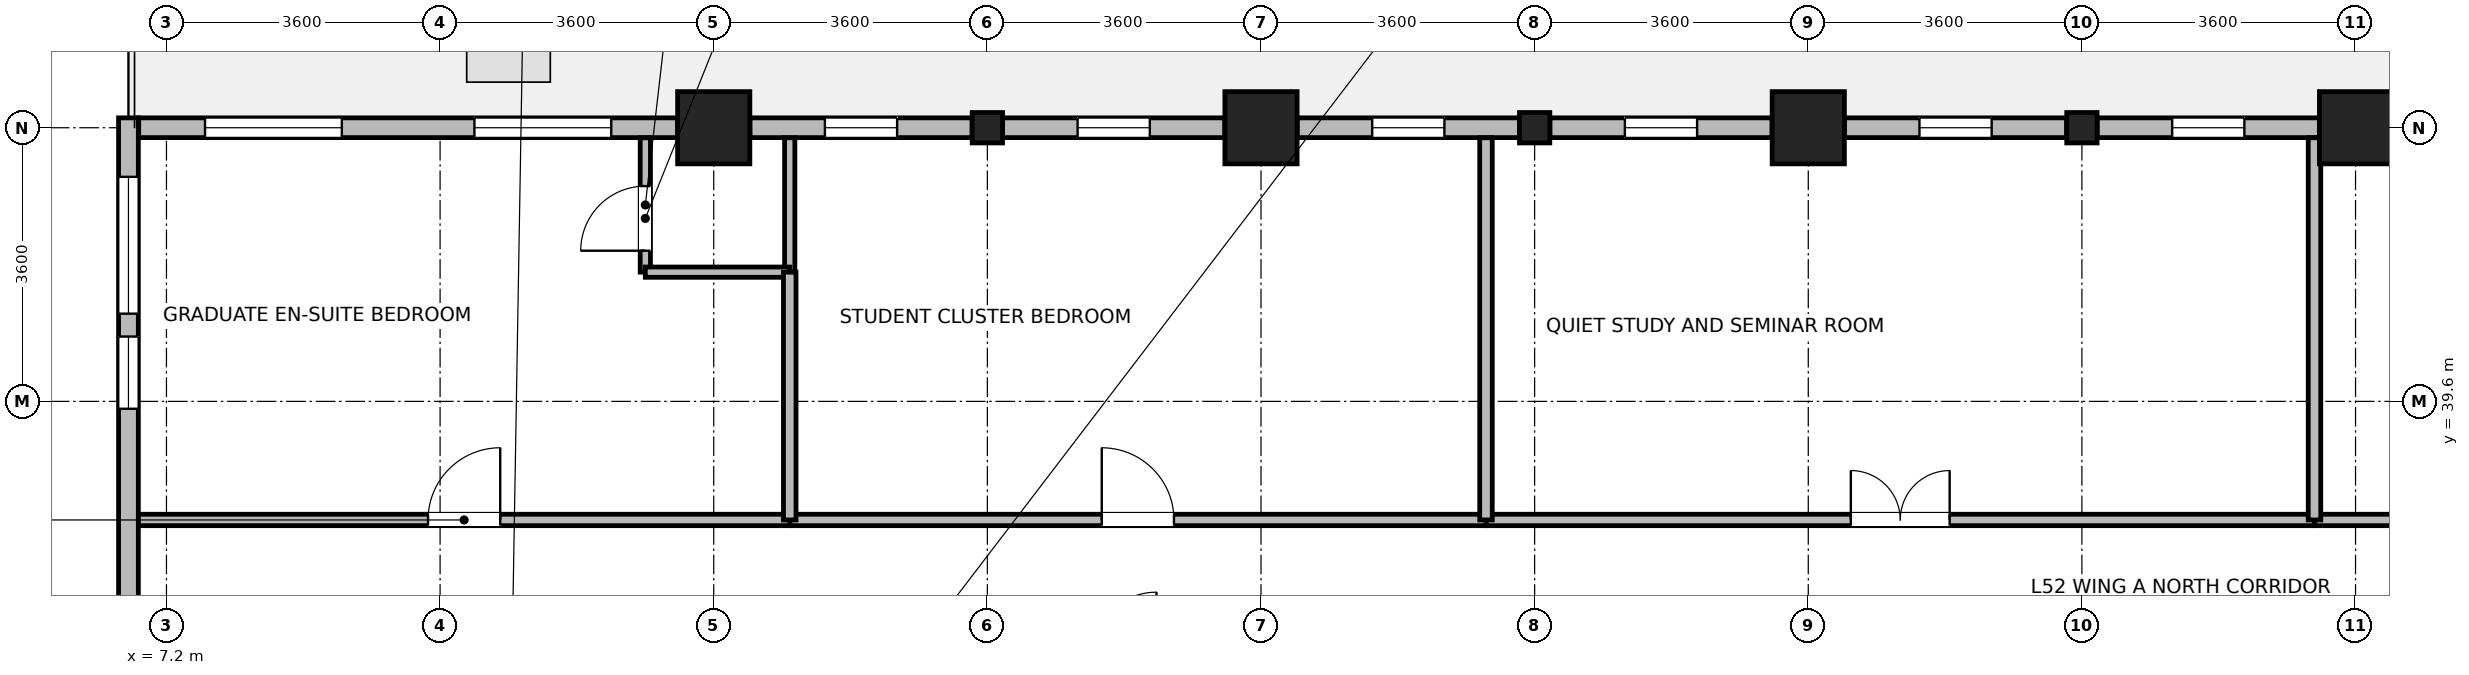
"""IFC4 building model, lengths in metres.
Left out: names, types, materials, properties, quantities, classifications, styles, units other than length and angle.
Written with IfcOpenShell. Run it as: python <this file> out.ifc"""

import sys

from ifc_helpers import new_model, si_unit, direction, frame, frame_2d, origin, origin_2d, place, context, subcontext, project, spatial, rectangle, i_section, extrude, source, transform, mapped, element, fill, save


model = new_model("IFC4")
c1 = context("Model", 3, precision=1e-05, world=origin(), true_north=direction((0.0, 1.0)))
c2 = subcontext(c1, "Body", "Model", "MODEL_VIEW")
j1 = project(units=[si_unit("LENGTHUNIT", "METRE"), si_unit("PLANEANGLEUNIT", "RADIAN")], contexts=[c1])
p1 = place(None, origin())
s1 = spatial("IfcSite", under=j1, at=p1, CompositionType="ELEMENT")
p2 = place(p1, origin())
s2 = spatial("IfcBuilding", under=s1, at=p2, CompositionType="ELEMENT")
p3 = place(p2, frame((0.0, 0.0, 205.5)))
s3 = spatial("IfcBuildingStorey", under=s2, at=p3, CompositionType="ELEMENT", Elevation=205.5)
m1 = source(origin(), c2, "Body", "SweptSolid", [
    extrude(rectangle(XDim=0.95, YDim=0.95, at=origin_2d()), origin(), (0.0, 0.0, 1.0), 3.7),
])
for number, where, z_axis, x_axis in (
    (1, (14.4, 43.2, 0.0), (0.0, 0.0, 1.0), (1.0, 0.0, 0.0)),
    (2, (21.6, 43.2, 0.0), (0.0, 0.0, 1.0), (1.0, 0.0, 0.0)),
    (3, (28.8, 43.2, 0.0), (0.0, 0.0, 1.0), (1.0, 0.0, 0.0)),
    (4, (36.0, 43.2, 0.0), (0.0, 0.0, 1.0), (1.0, 0.0, 0.0)),
):
    element("IfcColumn", number, at=place(p3, frame(where, z_axis=z_axis, x_axis=x_axis)), inside=s3, PredefinedType="COLUMN", context=c2, shape_type="MappedRepresentation", body=[
        mapped(m1, transform((0.0, 0.0, 0.0), x_axis=(1.0, 0.0, 0.0), y_axis=(0.0, 1.0, 0.0), z_axis=(0.0, 0.0, 1.0), scale=1.0)),
    ])
m2 = source(origin(), c2, "Body", "SweptSolid", [
    extrude(i_section(OverallWidth=0.399, OverallDepth=0.4, WebThickness=0.017, FlangeThickness=0.023, FilletRadius=0.015, at=origin_2d()), origin(), (0.0, 0.0, 1.0), 3.7),
])
for number, where, z_axis, x_axis in (
    (5, (18.0, 43.2, 0.0), (0.0, 0.0, 1.0), (1.0, 0.0, 0.0)),
    (6, (25.2, 43.2, 0.0), (0.0, 0.0, 1.0), (1.0, 0.0, 0.0)),
    (7, (32.4, 43.2, 0.0), (0.0, 0.0, 1.0), (1.0, 0.0, 0.0)),
):
    element("IfcColumn", number, at=place(p3, frame(where, z_axis=z_axis, x_axis=x_axis)), inside=s3, PredefinedType="COLUMN", context=c2, shape_type="MappedRepresentation", body=[
        mapped(m2, transform((0.0, 0.0, 0.0), x_axis=(1.0, 0.0, 0.0), y_axis=(0.0, 1.0, 0.0), z_axis=(0.0, 0.0, 1.0), scale=1.0)),
    ])
p4 = place(p3, frame((32.601, 43.2, 0.0), z_axis=(0.0, 0.0, 1.0), x_axis=(1.0, 0.0, 0.0)))
e8 = element("IfcWall", 8, at=p4, inside=s3, PredefinedType="STANDARD", context=c2, shape_type="SweptSolid", body=[
    extrude(rectangle(XDim=2.923, YDim=0.26, at=frame_2d((1.462, 0.0))), origin(), (0.0, 0.0, 1.0), 3.0),
])
p5 = place(p4, frame((0.987, 0.0, 0.85)))
e9 = element("IfcOpeningElement", 9, at=p5, cuts=e8, PredefinedType="OPENING", context=c2, shape_type="SweptSolid", body=[
    extrude(rectangle(XDim=0.95, YDim=1.75, at=frame_2d((0.475, 0.875))), frame((0.0, 0.14, 0.0), z_axis=(0.0, -1.0, 0.0), x_axis=(1.0, 0.0, 0.0)), (0.0, 0.0, 1.0), 0.28),
])
p6 = place(p3, frame((29.276, 43.2, 0.0), z_axis=(0.0, 0.0, 1.0), x_axis=(1.0, 0.0, 0.0)))
e10 = element("IfcWall", 10, at=p6, inside=s3, PredefinedType="STANDARD", context=c2, shape_type="SweptSolid", body=[
    extrude(rectangle(XDim=2.924, YDim=0.26, at=frame_2d((1.462, 0.0))), origin(), (0.0, 0.0, 1.0), 3.0),
])
p7 = place(p6, frame((0.987, 0.0, 0.85)))
e11 = element("IfcOpeningElement", 11, at=p7, cuts=e10, PredefinedType="OPENING", context=c2, shape_type="SweptSolid", body=[
    extrude(rectangle(XDim=0.95, YDim=1.75, at=frame_2d((0.475, 0.875))), frame((0.0, 0.14, 0.0), z_axis=(0.0, -1.0, 0.0), x_axis=(1.0, 0.0, 0.0)), (0.0, 0.0, 1.0), 0.28),
])
p8 = place(p3, frame((25.4, 43.2, 0.0), z_axis=(0.0, 0.0, 1.0), x_axis=(1.0, 0.0, 0.0)))
e12 = element("IfcWall", 12, at=p8, inside=s3, PredefinedType="STANDARD", context=c2, shape_type="SweptSolid", body=[
    extrude(rectangle(XDim=2.924, YDim=0.26, at=frame_2d((1.462, 0.0))), origin(), (0.0, 0.0, 1.0), 3.0),
])
p9 = place(p8, frame((0.987, 0.0, 0.85)))
e13 = element("IfcOpeningElement", 13, at=p9, cuts=e12, PredefinedType="OPENING", context=c2, shape_type="SweptSolid", body=[
    extrude(rectangle(XDim=0.95, YDim=1.75, at=frame_2d((0.475, 0.875))), frame((0.0, 0.14, 0.0), z_axis=(0.0, -1.0, 0.0), x_axis=(1.0, 0.0, 0.0)), (0.0, 0.0, 1.0), 0.28),
])
p10 = place(p3, frame((22.076, 43.2, 0.0), z_axis=(0.0, 0.0, 1.0), x_axis=(1.0, 0.0, 0.0)))
e14 = element("IfcWall", 14, at=p10, inside=s3, PredefinedType="STANDARD", context=c2, shape_type="SweptSolid", body=[
    extrude(rectangle(XDim=2.924, YDim=0.26, at=frame_2d((1.462, 0.0))), origin(), (0.0, 0.0, 1.0), 3.0),
])
p11 = place(p10, frame((0.987, 0.0, 0.85)))
e15 = element("IfcOpeningElement", 15, at=p11, cuts=e14, PredefinedType="OPENING", context=c2, shape_type="SweptSolid", body=[
    extrude(rectangle(XDim=0.95, YDim=1.75, at=frame_2d((0.475, 0.875))), frame((0.0, 0.14, 0.0), z_axis=(0.0, -1.0, 0.0), x_axis=(1.0, 0.0, 0.0)), (0.0, 0.0, 1.0), 0.28),
])
p12 = place(p3, frame((18.2, 43.2, 0.0), z_axis=(0.0, 0.0, 1.0), x_axis=(1.0, 0.0, 0.0)))
e16 = element("IfcWall", 16, at=p12, inside=s3, PredefinedType="STANDARD", context=c2, shape_type="SweptSolid", body=[
    extrude(rectangle(XDim=2.924, YDim=0.26, at=frame_2d((1.462, 0.0))), origin(), (0.0, 0.0, 1.0), 3.0),
])
p13 = place(p12, frame((0.987, 0.0, 0.85)))
e17 = element("IfcOpeningElement", 17, at=p13, cuts=e16, PredefinedType="OPENING", context=c2, shape_type="SweptSolid", body=[
    extrude(rectangle(XDim=0.95, YDim=1.75, at=frame_2d((0.475, 0.875))), frame((0.0, 0.14, 0.0), z_axis=(0.0, -1.0, 0.0), x_axis=(1.0, 0.0, 0.0)), (0.0, 0.0, 1.0), 0.28),
])
p14 = place(p3, frame((14.876, 43.2, 0.0), z_axis=(0.0, 0.0, 1.0), x_axis=(1.0, 0.0, 0.0)))
e18 = element("IfcWall", 18, at=p14, inside=s3, PredefinedType="STANDARD", context=c2, shape_type="SweptSolid", body=[
    extrude(rectangle(XDim=2.924, YDim=0.26, at=frame_2d((1.462, 0.0))), origin(), (0.0, 0.0, 1.0), 3.0),
])
p15 = place(p14, frame((0.987, 0.0, 0.85)))
e19 = element("IfcOpeningElement", 19, at=p15, cuts=e18, PredefinedType="OPENING", context=c2, shape_type="SweptSolid", body=[
    extrude(rectangle(XDim=0.95, YDim=1.75, at=frame_2d((0.475, 0.875))), frame((0.0, 0.14, 0.0), z_axis=(0.0, -1.0, 0.0), x_axis=(1.0, 0.0, 0.0)), (0.0, 0.0, 1.0), 0.28),
])
p16 = place(p3, frame((6.835, 43.2, 0.0), z_axis=(0.0, 0.0, 1.0), x_axis=(1.0, 0.0, 0.0)))
e20 = element("IfcWall", 20, at=p16, inside=s3, PredefinedType="STANDARD", context=c2, shape_type="SweptSolid", body=[
    extrude(rectangle(XDim=7.089, YDim=0.26, at=frame_2d((3.544, 0.0))), origin(), (0.0, 0.0, 1.0), 3.45),
])
p17 = place(p16, frame((0.872, 0.0, 0.85)))
e21 = element("IfcOpeningElement", 21, at=p17, cuts=e20, PredefinedType="OPENING", context=c2, shape_type="SweptSolid", body=[
    extrude(rectangle(XDim=1.8, YDim=1.85, at=frame_2d((0.9, 0.925))), frame((0.0, 0.14, 0.0), z_axis=(0.0, -1.0, 0.0), x_axis=(1.0, 0.0, 0.0)), (0.0, 0.0, 1.0), 0.28),
])
p18 = place(p16, frame((4.417, 0.0, 0.85)))
e22 = element("IfcOpeningElement", 22, at=p18, cuts=e20, PredefinedType="OPENING", context=c2, shape_type="SweptSolid", body=[
    extrude(rectangle(XDim=1.8, YDim=1.85, at=frame_2d((0.9, 0.925))), frame((0.0, 0.14, 0.0), z_axis=(0.0, -1.0, 0.0), x_axis=(1.0, 0.0, 0.0)), (0.0, 0.0, 1.0), 0.28),
])
p19 = place(p3, frame((6.7, 36.626, 0.0), z_axis=(0.0, 0.0, 1.0), x_axis=(0.0, 1.0, 0.0)))
e23 = element("IfcWall", 23, at=p19, inside=s3, PredefinedType="STANDARD", context=c2, shape_type="SweptSolid", body=[
    extrude(rectangle(XDim=6.704, YDim=0.26, at=frame_2d((3.352, 0.0))), origin(), (0.0, 0.0, 1.0), 3.45),
])
p20 = place(p19, frame((4.128, 0.0, 0.85)))
e24 = element("IfcOpeningElement", 24, at=p20, cuts=e23, PredefinedType="OPENING", context=c2, shape_type="SweptSolid", body=[
    extrude(rectangle(XDim=1.8, YDim=1.85, at=frame_2d((0.9, 0.925))), frame((0.0, 0.14, 0.0), z_axis=(0.0, -1.0, 0.0), x_axis=(1.0, 0.0, 0.0)), (0.0, 0.0, 1.0), 0.28),
])
p21 = place(p19, frame((2.877, 0.0, 0.85)))
e25 = element("IfcOpeningElement", 25, at=p21, cuts=e23, PredefinedType="OPENING", context=c2, shape_type="SweptSolid", body=[
    extrude(rectangle(XDim=0.95, YDim=1.75, at=frame_2d((0.475, 0.875))), frame((0.0, 0.14, 0.0), z_axis=(0.0, -1.0, 0.0), x_axis=(1.0, 0.0, 0.0)), (0.0, 0.0, 1.0), 0.28),
])
p22 = place(p3, frame((13.5, 41.3, 0.0), z_axis=(0.0, 0.0, 1.0), x_axis=(0.0, 1.0, 0.0)))
e26 = element("IfcWall", 26, at=p22, inside=s3, PredefinedType="PARTITIONING", context=c2, shape_type="SweptSolid", body=[
    extrude(rectangle(XDim=1.768, YDim=0.135, at=frame_2d((0.884, 0.0))), origin(), (0.0, 0.0, 1.0), 3.45),
])
p23 = place(p22, frame((0.282, 0.0, 0.0)))
e27 = element("IfcOpeningElement", 27, at=p23, cuts=e26, PredefinedType="OPENING", context=c2, shape_type="SweptSolid", body=[
    extrude(rectangle(XDim=0.85, YDim=2.04, at=frame_2d((0.425, 1.02))), frame((0.0, 0.078, 0.0), z_axis=(0.0, -1.0, 0.0), x_axis=(1.0, 0.0, 0.0)), (0.0, 0.0, 1.0), 0.155),
])
p24 = place(p3, frame((15.4, 41.3, 0.0), z_axis=(0.0, 0.0, 1.0), x_axis=(0.0, 1.0, 0.0)))
e28 = element("IfcWall", 28, at=p24, inside=s3, PredefinedType="PARTITIONING", context=c2, shape_type="SweptSolid", body=[
    extrude(rectangle(XDim=1.768, YDim=0.135, at=frame_2d((0.884, 0.0))), origin(), (0.0, 0.0, 1.0), 3.45),
])
p25 = place(p3, frame((13.5, 41.3, 0.0), z_axis=(0.0, 0.0, 1.0), x_axis=(1.0, 0.0, 0.0)))
e29 = element("IfcWall", 29, at=p25, inside=s3, PredefinedType="PARTITIONING", context=c2, shape_type="SweptSolid", body=[
    extrude(rectangle(XDim=1.9, YDim=0.135, at=frame_2d((0.95, 0.0))), origin(), (0.0, 0.0, 1.0), 3.45),
])
p26 = place(p3, frame((35.46, 38.04, 0.0), z_axis=(0.0, 0.0, 1.0), x_axis=(1.0, 0.0, 0.0)))
e30 = element("IfcWall", 30, at=p26, inside=s3, PredefinedType="PARTITIONING", context=c2, shape_type="SweptSolid", body=[
    extrude(rectangle(XDim=14.08, YDim=0.15, at=frame_2d((7.04, 0.0))), origin(), (0.0, 0.0, 1.0), 3.45),
])
p27 = place(p26, frame((6.59, 0.0, 0.0)))
e31 = element("IfcOpeningElement", 31, at=p27, cuts=e30, PredefinedType="OPENING", context=c2, shape_type="SweptSolid", body=[
    extrude(rectangle(XDim=0.9, YDim=2.08, at=frame_2d((0.45, 1.04))), frame((0.0, 0.085, 0.0), z_axis=(0.0, -1.0, 0.0), x_axis=(1.0, 0.0, 0.0)), (0.0, 0.0, 1.0), 0.17),
])
p28 = place(p3, frame((24.56, 38.04, 0.0), z_axis=(0.0, 0.0, 1.0), x_axis=(1.0, 0.0, 0.0)))
e32 = element("IfcWall", 32, at=p28, inside=s3, PredefinedType="PARTITIONING", context=c2, shape_type="SweptSolid", body=[
    extrude(rectangle(XDim=10.9, YDim=0.15, at=frame_2d((5.45, 0.0))), origin(), (0.0, 0.0, 1.0), 3.45),
])
p29 = place(p28, frame((4.8, 0.0, 0.0)))
e33 = element("IfcOpeningElement", 33, at=p29, cuts=e32, PredefinedType="OPENING", context=c2, shape_type="SweptSolid", body=[
    extrude(rectangle(XDim=1.3, YDim=2.12, at=frame_2d((0.65, 1.06))), frame((0.0, 0.085, 0.0), z_axis=(0.0, -1.0, 0.0), x_axis=(1.0, 0.0, 0.0)), (0.0, 0.0, 1.0), 0.17),
])
p30 = place(p3, frame((15.4, 38.04, 0.0), z_axis=(0.0, 0.0, 1.0), x_axis=(1.0, 0.0, 0.0)))
e34 = element("IfcWall", 34, at=p30, inside=s3, PredefinedType="PARTITIONING", context=c2, shape_type="SweptSolid", body=[
    extrude(rectangle(XDim=9.16, YDim=0.15, at=frame_2d((4.58, 0.0))), origin(), (0.0, 0.0, 1.0), 3.45),
])
p31 = place(p30, frame((4.105, 0.0, 0.0)))
e35 = element("IfcOpeningElement", 35, at=p31, cuts=e34, PredefinedType="OPENING", context=c2, shape_type="SweptSolid", body=[
    extrude(rectangle(XDim=0.95, YDim=2.1, at=frame_2d((0.475, 1.05))), frame((0.0, 0.085, 0.0), z_axis=(0.0, -1.0, 0.0), x_axis=(1.0, 0.0, 0.0)), (0.0, 0.0, 1.0), 0.17),
])
p32 = place(p3, frame((6.832, 38.04, 0.0), z_axis=(0.0, 0.0, 1.0), x_axis=(1.0, 0.0, 0.0)))
e36 = element("IfcWall", 36, at=p32, inside=s3, PredefinedType="PARTITIONING", context=c2, shape_type="SweptSolid", body=[
    extrude(rectangle(XDim=8.568, YDim=0.15, at=frame_2d((4.284, 0.0))), origin(), (0.0, 0.0, 1.0), 3.45),
])
p33 = place(p32, frame((3.809, 0.0, 0.0)))
e37 = element("IfcOpeningElement", 37, at=p33, cuts=e36, PredefinedType="OPENING", context=c2, shape_type="SweptSolid", body=[
    extrude(rectangle(XDim=0.95, YDim=2.1, at=frame_2d((0.475, 1.05))), frame((0.0, 0.085, 0.0), z_axis=(0.0, -1.0, 0.0), x_axis=(1.0, 0.0, 0.0)), (0.0, 0.0, 1.0), 0.17),
])
for number, where, z_axis, x_axis in (
    (38, (24.56, 38.04, 0.0), (0.0, 0.0, 1.0), (0.0, 1.0, 0.0)),
    (39, (35.46, 38.04, 0.0), (0.0, 0.0, 1.0), (0.0, 1.0, 0.0)),
):
    element("IfcWall", number, at=place(p3, frame(where, z_axis=z_axis, x_axis=x_axis)), inside=s3, PredefinedType="PARTITIONING", context=c2, shape_type="SweptSolid", body=[
        extrude(rectangle(XDim=5.028, YDim=0.165, at=frame_2d((2.514, 0.0))), origin(), (0.0, 0.0, 1.0), 3.45),
    ])
p34 = place(p3, frame((15.4, 38.04, 0.0), z_axis=(0.0, 0.0, 1.0), x_axis=(0.0, 1.0, 0.0)))
e40 = element("IfcWall", 40, at=p34, inside=s3, PredefinedType="PARTITIONING", context=c2, shape_type="SweptSolid", body=[
    extrude(rectangle(XDim=3.26, YDim=0.165, at=frame_2d((1.63, 0.0))), origin(), (0.0, 0.0, 1.0), 3.45),
])
p35 = place(p5, origin())
e41 = element("IfcWindow", 41, at=p35, inside=s3, PartitioningType="SINGLE_PANEL", PredefinedType="WINDOW", context=c2, shape_type="SweptSolid", body=[
    extrude(rectangle(XDim=0.95, YDim=1.75, at=frame_2d((0.475, 0.875))), frame((0.0, 0.03, 0.0), z_axis=(0.0, -1.0, 0.0), x_axis=(1.0, 0.0, 0.0)), (0.0, 0.0, 1.0), 0.06),
])
fill(e9, e41)
p36 = place(p7, origin())
e42 = element("IfcWindow", 42, at=p36, inside=s3, PartitioningType="SINGLE_PANEL", PredefinedType="WINDOW", context=c2, shape_type="SweptSolid", body=[
    extrude(rectangle(XDim=0.95, YDim=1.75, at=frame_2d((0.475, 0.875))), frame((0.0, 0.03, 0.0), z_axis=(0.0, -1.0, 0.0), x_axis=(1.0, 0.0, 0.0)), (0.0, 0.0, 1.0), 0.06),
])
fill(e11, e42)
p37 = place(p9, origin())
e43 = element("IfcWindow", 43, at=p37, inside=s3, PartitioningType="SINGLE_PANEL", PredefinedType="WINDOW", context=c2, shape_type="SweptSolid", body=[
    extrude(rectangle(XDim=0.95, YDim=1.75, at=frame_2d((0.475, 0.875))), frame((0.0, 0.03, 0.0), z_axis=(0.0, -1.0, 0.0), x_axis=(1.0, 0.0, 0.0)), (0.0, 0.0, 1.0), 0.06),
])
fill(e13, e43)
p38 = place(p11, origin())
e44 = element("IfcWindow", 44, at=p38, inside=s3, PartitioningType="SINGLE_PANEL", PredefinedType="WINDOW", context=c2, shape_type="SweptSolid", body=[
    extrude(rectangle(XDim=0.95, YDim=1.75, at=frame_2d((0.475, 0.875))), frame((0.0, 0.03, 0.0), z_axis=(0.0, -1.0, 0.0), x_axis=(1.0, 0.0, 0.0)), (0.0, 0.0, 1.0), 0.06),
])
fill(e15, e44)
p39 = place(p13, origin())
e45 = element("IfcWindow", 45, at=p39, inside=s3, PartitioningType="SINGLE_PANEL", PredefinedType="WINDOW", context=c2, shape_type="SweptSolid", body=[
    extrude(rectangle(XDim=0.95, YDim=1.75, at=frame_2d((0.475, 0.875))), frame((0.0, 0.03, 0.0), z_axis=(0.0, -1.0, 0.0), x_axis=(1.0, 0.0, 0.0)), (0.0, 0.0, 1.0), 0.06),
])
fill(e17, e45)
p40 = place(p15, origin())
e46 = element("IfcWindow", 46, at=p40, inside=s3, PartitioningType="SINGLE_PANEL", PredefinedType="WINDOW", context=c2, shape_type="SweptSolid", body=[
    extrude(rectangle(XDim=0.95, YDim=1.75, at=frame_2d((0.475, 0.875))), frame((0.0, 0.03, 0.0), z_axis=(0.0, -1.0, 0.0), x_axis=(1.0, 0.0, 0.0)), (0.0, 0.0, 1.0), 0.06),
])
fill(e19, e46)
p41 = place(p17, origin())
e47 = element("IfcWindow", 47, at=p41, inside=s3, PartitioningType="SINGLE_PANEL", PredefinedType="WINDOW", context=c2, shape_type="SweptSolid", body=[
    extrude(rectangle(XDim=1.8, YDim=1.85, at=frame_2d((0.9, 0.925))), frame((0.0, 0.03, 0.0), z_axis=(0.0, -1.0, 0.0), x_axis=(1.0, 0.0, 0.0)), (0.0, 0.0, 1.0), 0.06),
])
fill(e21, e47)
p42 = place(p18, origin())
e48 = element("IfcWindow", 48, at=p42, inside=s3, PartitioningType="SINGLE_PANEL", PredefinedType="WINDOW", context=c2, shape_type="SweptSolid", body=[
    extrude(rectangle(XDim=1.8, YDim=1.85, at=frame_2d((0.9, 0.925))), frame((0.0, 0.03, 0.0), z_axis=(0.0, -1.0, 0.0), x_axis=(1.0, 0.0, 0.0)), (0.0, 0.0, 1.0), 0.06),
])
fill(e22, e48)
p43 = place(p20, origin())
e49 = element("IfcWindow", 49, at=p43, inside=s3, PartitioningType="SINGLE_PANEL", PredefinedType="WINDOW", context=c2, shape_type="SweptSolid", body=[
    extrude(rectangle(XDim=1.8, YDim=1.85, at=frame_2d((0.9, 0.925))), frame((0.0, 0.03, 0.0), z_axis=(0.0, -1.0, 0.0), x_axis=(1.0, 0.0, 0.0)), (0.0, 0.0, 1.0), 0.06),
])
fill(e24, e49)
p44 = place(p21, origin())
e50 = element("IfcWindow", 50, at=p44, inside=s3, PartitioningType="SINGLE_PANEL", PredefinedType="WINDOW", context=c2, shape_type="SweptSolid", body=[
    extrude(rectangle(XDim=0.95, YDim=1.75, at=frame_2d((0.475, 0.875))), frame((0.0, 0.03, 0.0), z_axis=(0.0, -1.0, 0.0), x_axis=(1.0, 0.0, 0.0)), (0.0, 0.0, 1.0), 0.06),
])
fill(e25, e50)
p45 = place(p23, origin())
e51 = element("IfcDoor", 51, at=p45, inside=s3, OperationType="SINGLE_SWING_LEFT", PredefinedType="DOOR", context=c2, shape_type="SweptSolid", body=[
    extrude(rectangle(XDim=0.85, YDim=2.04, at=frame_2d((0.425, 1.02))), frame((0.0, 0.025, 0.0), z_axis=(0.0, -1.0, 0.0), x_axis=(1.0, 0.0, 0.0)), (0.0, 0.0, 1.0), 0.05),
])
fill(e27, e51)
p46 = place(p29, origin())
e52 = element("IfcDoor", 52, at=p46, inside=s3, OperationType="DOUBLE_DOOR_SINGLE_SWING", PredefinedType="DOOR", context=c2, shape_type="SweptSolid", body=[
    extrude(rectangle(XDim=1.3, YDim=2.12, at=frame_2d((0.65, 1.06))), frame((0.0, 0.025, 0.0), z_axis=(0.0, -1.0, 0.0), x_axis=(1.0, 0.0, 0.0)), (0.0, 0.0, 1.0), 0.05),
])
fill(e33, e52)
p47 = place(p31, origin())
e53 = element("IfcDoor", 53, at=p47, inside=s3, OperationType="SINGLE_SWING_LEFT", PredefinedType="DOOR", context=c2, shape_type="SweptSolid", body=[
    extrude(rectangle(XDim=0.95, YDim=2.1, at=frame_2d((0.475, 1.05))), frame((0.0, 0.025, 0.0), z_axis=(0.0, -1.0, 0.0), x_axis=(1.0, 0.0, 0.0)), (0.0, 0.0, 1.0), 0.05),
])
fill(e35, e53)
p48 = place(p33, origin())
e54 = element("IfcDoor", 54, at=p48, inside=s3, OperationType="SINGLE_SWING_RIGHT", PredefinedType="DOOR", context=c2, shape_type="SweptSolid", body=[
    extrude(rectangle(XDim=0.95, YDim=2.1, at=frame_2d((0.475, 1.05))), frame((0.0, 0.025, 0.0), z_axis=(0.0, -1.0, 0.0), x_axis=(1.0, 0.0, 0.0)), (0.0, 0.0, 1.0), 0.05),
])
fill(e37, e54)
save(model, sys.argv[1])
